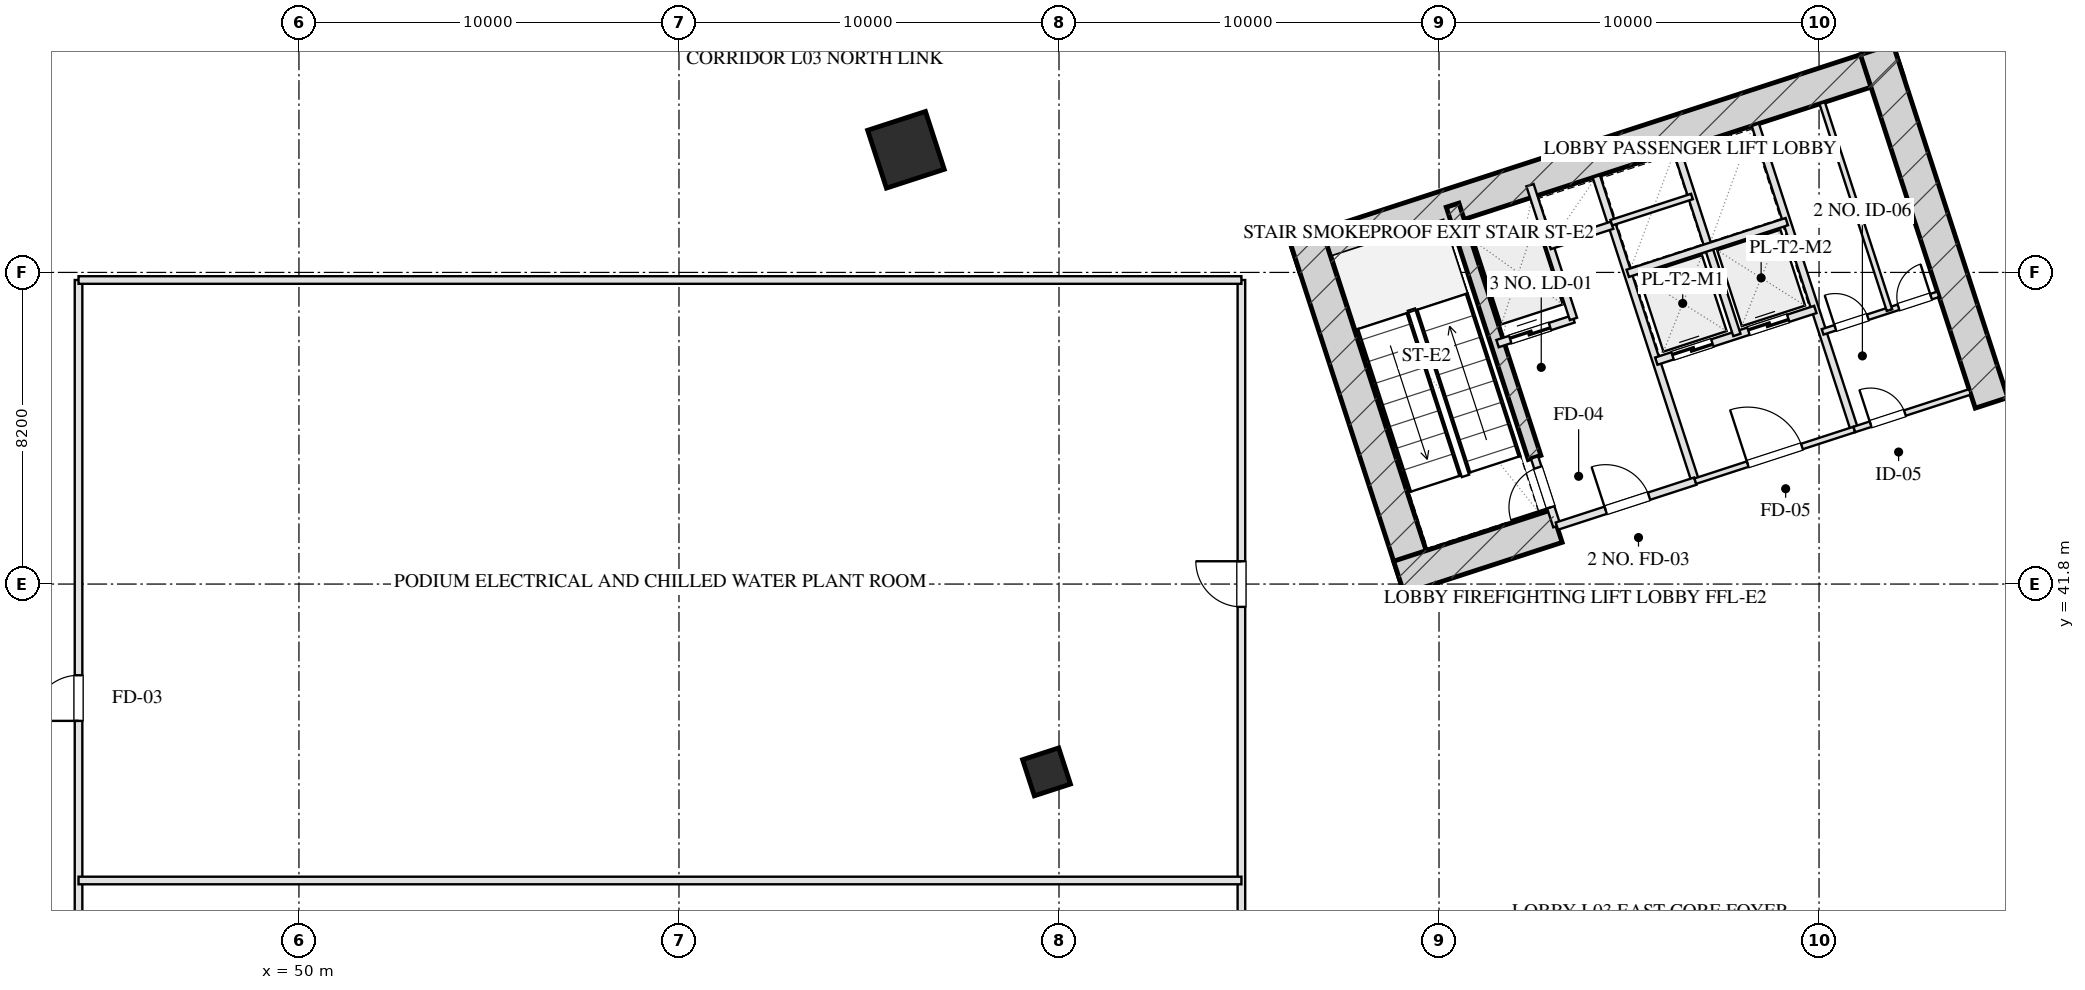
"""IFC4 building model, lengths in metres.
Left out: names, types, materials, properties, quantities, classifications, styles, units other than length and angle.
Written with IfcOpenShell. Run it as: python <this file> out.ifc"""

import sys

from ifc_helpers import new_model, si_unit, direction, frame, frame_2d, origin, origin_2d, place, context, subcontext, project, spatial, rectangle, hollow_rectangle, extrude, element, fill, save


model = new_model("IFC4")
c1 = context("Model", 3, precision=1e-05, world=origin(), true_north=direction((0.0, 1.0)))
c2 = subcontext(c1, "Body", "Model", "MODEL_VIEW")
j1 = project(units=[si_unit("LENGTHUNIT", "METRE"), si_unit("PLANEANGLEUNIT", "RADIAN")], contexts=[c1])
p1 = place(None, origin())
s1 = spatial("IfcSite", under=j1, at=p1, CompositionType="ELEMENT")
p2 = place(p1, origin())
s2 = spatial("IfcBuilding", under=s1, at=p2, CompositionType="ELEMENT")
p3 = place(p2, frame((0.0, 0.0, 16.5)))
s3 = spatial("IfcBuildingStorey", under=s2, at=p3, CompositionType="ELEMENT", Elevation=16.5)
p4 = place(p3, frame((76.201, 50.419, 0.0), z_axis=(0.0, 0.0, 1.0), x_axis=(0.951056412142, 0.309017314926, 0.0)))
e1 = element("IfcWall", 1, at=p4, inside=s3, PredefinedType="SHEAR", context=c2, shape_type="SweptSolid", body=[
    extrude(rectangle(XDim=16.7, YDim=0.9, at=frame_2d((8.35, 0.0))), origin(), (0.0, 0.0, 1.0), 5.5),
])
for number, where, z_axis, x_axis in (
    (2, (79.512, 41.685, 0.0), (0.0, 0.0, 1.0), (-0.309, 0.951, 0.0)),
    (3, (94.539, 46.568, 0.0), (0.0, 0.0, 1.0), (-0.309, 0.951, 0.0)),
):
    element("IfcWall", number, at=place(p3, frame(where, z_axis=z_axis, x_axis=x_axis)), inside=s3, PredefinedType="SHEAR", context=c2, shape_type="SweptSolid", body=[
        extrude(rectangle(XDim=9.78, YDim=0.9, at=frame_2d((4.89, 0.0))), origin(), (0.0, 0.0, 1.0), 5.5),
    ])
p5 = place(p3, frame((82.514, 45.131, 0.0), z_axis=(0.0, 0.0, 1.0), x_axis=(-0.308988790936, 0.951065679686, 0.0)))
e4 = element("IfcWall", 4, at=p5, inside=s3, PredefinedType="SHEAR", context=c2, shape_type="SweptSolid", body=[
    extrude(rectangle(XDim=6.98, YDim=0.35, at=frame_2d((3.49, 0.0))), origin(), (0.0, 0.0, 1.0), 5.5),
])
p6 = place(p3, frame((78.945, 41.974, 0.0), z_axis=(0.0, 0.0, 1.0), x_axis=(0.951058289404, 0.309011537255, 0.0)))
e5 = element("IfcWall", 5, at=p6, inside=s3, PredefinedType="SHEAR", context=c2, shape_type="SweptSolid", body=[
    extrude(rectangle(XDim=4.37, YDim=0.9, at=frame_2d((2.185, 0.0))), origin(), (0.0, 0.0, 1.0), 5.5),
])
p7 = place(p3, frame((65.973, 53.226, 0.0), z_axis=(0.0, 0.0, 1.0), x_axis=(0.951056516295, 0.309016994375, 0.0)))
e6 = element("IfcColumn", 6, at=p7, inside=s3, PredefinedType="COLUMN", context=c2, shape_type="SweptSolid", body=[
    extrude(hollow_rectangle(XDim=1.6, YDim=1.6, WallThickness=0.055, at=origin_2d()), origin(), (0.0, 0.0, 1.0), 5.501),
])
p8 = place(p3, frame((69.672, 36.858, 0.0), z_axis=(0.0, 0.0, 1.0), x_axis=(0.951056516295, 0.309016994375, 0.0)))
e7 = element("IfcColumn", 7, at=p8, inside=s3, PredefinedType="COLUMN", context=c2, shape_type="SweptSolid", body=[
    extrude(hollow_rectangle(XDim=1.0, YDim=1.0, WallThickness=0.036, at=origin_2d()), origin(), (0.0, 0.0, 1.0), 5.501),
])
p9 = place(p3, frame((83.101, 43.324, 0.0), z_axis=(0.0, 0.0, 1.0), x_axis=(-0.309048298632, 0.951046344356, 0.0)))
e8 = element("IfcWall", 8, at=p9, inside=s3, PredefinedType="PARTITIONING", context=c2, shape_type="SweptSolid", body=[
    extrude(rectangle(XDim=1.9, YDim=0.2, at=frame_2d((0.95, 0.0))), origin(), (0.0, 0.0, 1.0), 5.185),
])
p10 = place(p9, frame((0.52, 0.0, 0.0)))
e9 = element("IfcOpeningElement", 9, at=p10, cuts=e8, PredefinedType="OPENING", context=c2, shape_type="SweptSolid", body=[
    extrude(rectangle(XDim=1.1, YDim=2.05, at=frame_2d((0.55, 1.025))), frame((0.0, 0.11, 0.0), z_axis=(0.0, -1.0, 0.0), x_axis=(1.0, 0.0, 0.0)), (0.0, 0.0, 1.0), 0.22),
])
p11 = place(p3, frame((86.743, 44.508, 0.0), z_axis=(0.0, 0.0, 1.0), x_axis=(-0.309016001439, 0.951056838919, 0.0)))
e10 = element("IfcWall", 10, at=p11, inside=s3, PredefinedType="PARTITIONING", context=c2, shape_type="SweptSolid", body=[
    extrude(rectangle(XDim=8.43, YDim=0.2, at=frame_2d((4.215, 0.0))), origin(), (0.0, 0.0, 1.0), 5.185),
])
p12 = place(p3, frame((83.101, 43.324, 0.0), z_axis=(0.0, 0.0, 1.0), x_axis=(0.951052804469, 0.309028417967, 0.0)))
e11 = element("IfcWall", 11, at=p12, inside=s3, PredefinedType="PARTITIONING", context=c2, shape_type="SweptSolid", body=[
    extrude(rectangle(XDim=3.83, YDim=0.2, at=frame_2d((1.915, 0.0))), origin(), (0.0, 0.0, 1.0), 5.185),
])
p13 = place(p12, frame((1.35, 0.0, 0.0)))
e12 = element("IfcOpeningElement", 12, at=p13, cuts=e11, PredefinedType="OPENING", context=c2, shape_type="SweptSolid", body=[
    extrude(rectangle(XDim=1.2, YDim=2.05, at=frame_2d((0.6, 1.025))), frame((0.0, 0.11, 0.0), z_axis=(0.0, -1.0, 0.0), x_axis=(1.0, 0.0, 0.0)), (0.0, 0.0, 1.0), 0.22),
])
p14 = place(p3, frame((81.54, 48.127, 0.0), z_axis=(0.0, 0.0, 1.0), x_axis=(0.951062257173, 0.308999325213, 0.0)))
e13 = element("IfcWall", 13, at=p14, inside=s3, PredefinedType="PARTITIONING", context=c2, shape_type="SweptSolid", body=[
    extrude(rectangle(XDim=2.1, YDim=0.2, at=frame_2d((1.05, 0.0))), origin(), (0.0, 0.0, 1.0), 5.185),
])
p15 = place(p14, frame((0.35, 0.0, 0.0)))
e14 = element("IfcOpeningElement", 14, at=p15, cuts=e13, PredefinedType="OPENING", context=c2, shape_type="SweptSolid", body=[
    extrude(rectangle(XDim=1.1, YDim=2.05, at=frame_2d((0.55, 1.025))), frame((0.0, 0.11, 0.0), z_axis=(0.0, -1.0, 0.0), x_axis=(1.0, 0.0, 0.0)), (0.0, 0.0, 1.0), 0.22),
])
p16 = place(p3, frame((83.538, 48.776, 0.0), z_axis=(0.0, 0.0, 1.0), x_axis=(-0.3089935693, 0.951064127245, 0.0)))
e15 = element("IfcWall", 15, at=p16, inside=s3, PredefinedType="PARTITIONING", context=c2, shape_type="SweptSolid", body=[
    extrude(rectangle(XDim=3.7, YDim=0.2, at=frame_2d((1.85, 0.0))), origin(), (0.0, 0.0, 1.0), 5.185),
])
p17 = place(p3, frame((82.91, 50.707, 0.0), z_axis=(0.0, 0.0, 1.0), x_axis=(0.951041328149, 0.309063734775, 0.0)))
e16 = element("IfcWall", 16, at=p17, inside=s3, PredefinedType="PARTITIONING", context=c2, shape_type="SweptSolid", body=[
    extrude(rectangle(XDim=1.73, YDim=0.2, at=frame_2d((0.865, 0.0))), origin(), (0.0, 0.0, 1.0), 5.185),
])
p18 = place(p3, frame((90.928, 45.868, 0.0), z_axis=(0.0, 0.0, 1.0), x_axis=(-0.309042196757, 0.951048327176, 0.0)))
e17 = element("IfcWall", 17, at=p18, inside=s3, PredefinedType="PARTITIONING", context=c2, shape_type="SweptSolid", body=[
    extrude(rectangle(XDim=8.43, YDim=0.2, at=frame_2d((4.215, 0.0))), origin(), (0.0, 0.0, 1.0), 5.185),
])
p19 = place(p3, frame((86.743, 44.508, 0.0), z_axis=(0.0, 0.0, 1.0), x_axis=(0.951063829732, 0.308994485023, 0.0)))
e18 = element("IfcWall", 18, at=p19, inside=s3, PredefinedType="PARTITIONING", context=c2, shape_type="SweptSolid", body=[
    extrude(rectangle(XDim=4.4, YDim=0.15, at=frame_2d((2.2, 0.0))), origin(), (0.0, 0.0, 1.0), 5.185),
])
p20 = place(p19, frame((1.45, 0.0, 0.0)))
e19 = element("IfcOpeningElement", 19, at=p20, cuts=e18, PredefinedType="OPENING", context=c2, shape_type="SweptSolid", body=[
    extrude(rectangle(XDim=1.5, YDim=2.05, at=frame_2d((0.75, 1.025))), frame((0.0, 0.085, 0.0), z_axis=(0.0, -1.0, 0.0), x_axis=(1.0, 0.0, 0.0)), (0.0, 0.0, 1.0), 0.17),
])
p21 = place(p3, frame((85.718, 47.666, 0.0), z_axis=(0.0, 0.0, 1.0), x_axis=(0.951058531764, 0.30901079133, 0.0)))
e20 = element("IfcWall", 20, at=p21, inside=s3, PredefinedType="PARTITIONING", context=c2, shape_type="SweptSolid", body=[
    extrude(rectangle(XDim=4.4, YDim=0.2, at=frame_2d((2.2, 0.0))), origin(), (0.0, 0.0, 1.0), 5.185),
])
p22 = place(p21, frame((0.45, 0.0, 0.0)))
e21 = element("IfcOpeningElement", 21, at=p22, cuts=e20, PredefinedType="OPENING", context=c2, shape_type="SweptSolid", body=[
    extrude(rectangle(XDim=1.1, YDim=2.05, at=frame_2d((0.55, 1.025))), frame((0.0, 0.11, 0.0), z_axis=(0.0, -1.0, 0.0), x_axis=(1.0, 0.0, 0.0)), (0.0, 0.0, 1.0), 0.22),
])
p23 = place(p21, frame((2.55, 0.0, 0.0)))
e22 = element("IfcOpeningElement", 22, at=p23, cuts=e20, PredefinedType="OPENING", context=c2, shape_type="SweptSolid", body=[
    extrude(rectangle(XDim=1.1, YDim=2.05, at=frame_2d((0.55, 1.025))), frame((0.0, 0.11, 0.0), z_axis=(0.0, -1.0, 0.0), x_axis=(1.0, 0.0, 0.0)), (0.0, 0.0, 1.0), 0.22),
])
p24 = place(p3, frame((87.838, 48.354, 0.0), z_axis=(0.0, 0.0, 1.0), x_axis=(-0.3090093719, 0.951058992953, 0.0)))
e23 = element("IfcWall", 23, at=p24, inside=s3, PredefinedType="PARTITIONING", context=c2, shape_type="SweptSolid", body=[
    extrude(rectangle(XDim=5.11, YDim=0.2, at=frame_2d((2.555, 0.0))), origin(), (0.0, 0.0, 1.0), 5.185),
])
p25 = place(p3, frame((84.967, 49.977, 0.0), z_axis=(0.0, 0.0, 1.0), x_axis=(0.951063829732, 0.308994485023, 0.0)))
e24 = element("IfcWall", 24, at=p25, inside=s3, PredefinedType="PARTITIONING", context=c2, shape_type="SweptSolid", body=[
    extrude(rectangle(XDim=4.4, YDim=0.2, at=frame_2d((2.2, 0.0))), origin(), (0.0, 0.0, 1.0), 5.185),
])
p26 = place(p3, frame((84.534, 51.308, 0.0), z_axis=(0.0, 0.0, 1.0), x_axis=(0.951075093106, 0.308959814982, 0.0)))
e25 = element("IfcWall", 25, at=p26, inside=s3, PredefinedType="PARTITIONING", context=c2, shape_type="SweptSolid", body=[
    extrude(rectangle(XDim=2.23, YDim=0.15, at=frame_2d((1.115, 0.0))), origin(), (0.0, 0.0, 1.0), 5.185),
])
p27 = place(p3, frame((90.928, 45.868, 0.0), z_axis=(0.0, 0.0, 1.0), x_axis=(0.951059297078, 0.309008435874, 0.0)))
e26 = element("IfcWall", 26, at=p27, inside=s3, PredefinedType="PARTITIONING", context=c2, shape_type="SweptSolid", body=[
    extrude(rectangle(XDim=3.2, YDim=0.15, at=frame_2d((1.6, 0.0))), origin(), (0.0, 0.0, 1.0), 5.185),
])
p28 = place(p27, frame((0.45, 0.0, 0.0)))
e27 = element("IfcOpeningElement", 27, at=p28, cuts=e26, PredefinedType="OPENING", context=c2, shape_type="SweptSolid", body=[
    extrude(rectangle(XDim=0.95, YDim=2.05, at=frame_2d((0.475, 1.025))), frame((0.0, 0.085, 0.0), z_axis=(0.0, -1.0, 0.0), x_axis=(1.0, 0.0, 0.0)), (0.0, 0.0, 1.0), 0.17),
])
p29 = place(p3, frame((90.094, 48.436, 0.0), z_axis=(0.0, 0.0, 1.0), x_axis=(0.951066581729, 0.308986014439, 0.0)))
e28 = element("IfcWall", 28, at=p29, inside=s3, PredefinedType="PARTITIONING", context=c2, shape_type="SweptSolid", body=[
    extrude(rectangle(XDim=3.2, YDim=0.15, at=frame_2d((1.6, 0.0))), origin(), (0.0, 0.0, 1.0), 5.185),
])
p30 = place(p29, frame((0.35, 0.0, 0.0)))
e29 = element("IfcOpeningElement", 29, at=p30, cuts=e28, PredefinedType="OPENING", context=c2, shape_type="SweptSolid", body=[
    extrude(rectangle(XDim=0.9, YDim=2.05, at=frame_2d((0.45, 1.025))), frame((0.0, 0.085, 0.0), z_axis=(0.0, -1.0, 0.0), x_axis=(1.0, 0.0, 0.0)), (0.0, 0.0, 1.0), 0.17),
])
p31 = place(p29, frame((2.1, 0.0, 0.0)))
e30 = element("IfcOpeningElement", 30, at=p31, cuts=e28, PredefinedType="OPENING", context=c2, shape_type="SweptSolid", body=[
    extrude(rectangle(XDim=0.9, YDim=2.05, at=frame_2d((0.45, 1.025))), frame((0.0, 0.085, 0.0), z_axis=(0.0, -1.0, 0.0), x_axis=(1.0, 0.0, 0.0)), (0.0, 0.0, 1.0), 0.17),
])
p32 = place(p3, frame((91.853, 49.007, 0.0), z_axis=(0.0, 0.0, 1.0), x_axis=(-0.309022487551, 0.951054731437, 0.0)))
e31 = element("IfcWall", 31, at=p32, inside=s3, PredefinedType="PARTITIONING", context=c2, shape_type="SweptSolid", body=[
    extrude(rectangle(XDim=5.73, YDim=0.15, at=frame_2d((2.865, 0.0))), origin(), (0.0, 0.0, 1.0), 5.185),
])
p33 = place(p3, frame((44.2, 18.2, 0.0), z_axis=(0.0, 0.0, 1.0), x_axis=(0.0, 1.0, 0.0)))
e32 = element("IfcWall", 32, at=p33, inside=s3, PredefinedType="PARTITIONING", context=c2, shape_type="SweptSolid", body=[
    extrude(rectangle(XDim=31.6, YDim=0.2, at=frame_2d((15.8, 0.0))), origin(), (0.0, 0.0, 1.0), 5.185),
])
p34 = place(p33, frame((5.1, 0.0, 0.0)))
e33 = element("IfcOpeningElement", 33, at=p34, cuts=e32, PredefinedType="OPENING", context=c2, shape_type="SweptSolid", body=[
    extrude(rectangle(XDim=1.2, YDim=2.05, at=frame_2d((0.6, 1.025))), frame((0.0, 0.11, 0.0), z_axis=(0.0, -1.0, 0.0), x_axis=(1.0, 0.0, 0.0)), (0.0, 0.0, 1.0), 0.22),
])
p35 = place(p33, frame((20.0, 0.0, 0.0)))
e34 = element("IfcOpeningElement", 34, at=p35, cuts=e32, PredefinedType="OPENING", context=c2, shape_type="SweptSolid", body=[
    extrude(rectangle(XDim=1.2, YDim=2.05, at=frame_2d((0.6, 1.025))), frame((0.0, 0.11, 0.0), z_axis=(0.0, -1.0, 0.0), x_axis=(1.0, 0.0, 0.0)), (0.0, 0.0, 1.0), 0.22),
])
p36 = place(p3, frame((74.8, 18.2, 0.0), z_axis=(0.0, 0.0, 1.0), x_axis=(0.0, 1.0, 0.0)))
e35 = element("IfcWall", 35, at=p36, inside=s3, PredefinedType="PARTITIONING", context=c2, shape_type="SweptSolid", body=[
    extrude(rectangle(XDim=31.6, YDim=0.2, at=frame_2d((15.8, 0.0))), origin(), (0.0, 0.0, 1.0), 5.185),
])
p37 = place(p36, frame((23.0, 0.0, 0.0)))
e36 = element("IfcOpeningElement", 36, at=p37, cuts=e35, PredefinedType="OPENING", context=c2, shape_type="SweptSolid", body=[
    extrude(rectangle(XDim=1.2, YDim=2.05, at=frame_2d((0.6, 1.025))), frame((0.0, 0.11, 0.0), z_axis=(0.0, -1.0, 0.0), x_axis=(1.0, 0.0, 0.0)), (0.0, 0.0, 1.0), 0.22),
])
p38 = place(p3, frame((44.2, 49.8, 0.0), z_axis=(0.0, 0.0, 1.0), x_axis=(1.0, 0.0, 0.0)))
e37 = element("IfcWall", 37, at=p38, inside=s3, PredefinedType="PARTITIONING", context=c2, shape_type="SweptSolid", body=[
    extrude(rectangle(XDim=30.6, YDim=0.2, at=frame_2d((15.3, 0.0))), origin(), (0.0, 0.0, 1.0), 5.185),
])
p39 = place(p3, frame((44.2, 34.0, 0.0), z_axis=(0.0, 0.0, 1.0), x_axis=(1.0, 0.0, 0.0)))
e38 = element("IfcWall", 38, at=p39, inside=s3, PredefinedType="PARTITIONING", context=c2, shape_type="SweptSolid", body=[
    extrude(rectangle(XDim=30.6, YDim=0.2, at=frame_2d((15.3, 0.0))), origin(), (0.0, 0.0, 1.0), 3.775),
])
p40 = place(p10, origin())
e39 = element("IfcDoor", 39, at=p40, inside=s3, OperationType="SINGLE_SWING_LEFT", PredefinedType="DOOR", context=c2, shape_type="SweptSolid", body=[
    extrude(rectangle(XDim=1.1, YDim=2.05, at=frame_2d((0.55, 1.025))), frame((0.0, 0.025, 0.0), z_axis=(0.0, -1.0, 0.0), x_axis=(1.0, 0.0, 0.0)), (0.0, 0.0, 1.0), 0.05),
])
fill(e9, e39)
p41 = place(p13, origin())
e40 = element("IfcDoor", 40, at=p41, inside=s3, OperationType="SINGLE_SWING_LEFT", PredefinedType="DOOR", context=c2, shape_type="SweptSolid", body=[
    extrude(rectangle(XDim=1.2, YDim=2.05, at=frame_2d((0.6, 1.025))), frame((0.0, 0.025, 0.0), z_axis=(0.0, -1.0, 0.0), x_axis=(1.0, 0.0, 0.0)), (0.0, 0.0, 1.0), 0.05),
])
fill(e12, e40)
p42 = place(p15, origin())
e41 = element("IfcDoor", 41, at=p42, inside=s3, OperationType="DOUBLE_DOOR_SLIDING", PredefinedType="DOOR", context=c2, shape_type="SweptSolid", body=[
    extrude(rectangle(XDim=1.1, YDim=2.05, at=frame_2d((0.55, 1.025))), frame((0.0, 0.025, 0.0), z_axis=(0.0, -1.0, 0.0), x_axis=(1.0, 0.0, 0.0)), (0.0, 0.0, 1.0), 0.05),
])
fill(e14, e41)
p43 = place(p20, origin())
e42 = element("IfcDoor", 42, at=p43, inside=s3, OperationType="SINGLE_SWING_LEFT", PredefinedType="DOOR", context=c2, shape_type="SweptSolid", body=[
    extrude(rectangle(XDim=1.5, YDim=2.05, at=frame_2d((0.75, 1.025))), frame((0.0, 0.025, 0.0), z_axis=(0.0, -1.0, 0.0), x_axis=(1.0, 0.0, 0.0)), (0.0, 0.0, 1.0), 0.05),
])
fill(e19, e42)
p44 = place(p22, origin())
e43 = element("IfcDoor", 43, at=p44, inside=s3, OperationType="DOUBLE_DOOR_SLIDING", PredefinedType="DOOR", context=c2, shape_type="SweptSolid", body=[
    extrude(rectangle(XDim=1.1, YDim=2.05, at=frame_2d((0.55, 1.025))), frame((0.0, 0.025, 0.0), z_axis=(0.0, -1.0, 0.0), x_axis=(1.0, 0.0, 0.0)), (0.0, 0.0, 1.0), 0.05),
])
fill(e21, e43)
p45 = place(p23, origin())
e44 = element("IfcDoor", 44, at=p45, inside=s3, OperationType="DOUBLE_DOOR_SLIDING", PredefinedType="DOOR", context=c2, shape_type="SweptSolid", body=[
    extrude(rectangle(XDim=1.1, YDim=2.05, at=frame_2d((0.55, 1.025))), frame((0.0, 0.025, 0.0), z_axis=(0.0, -1.0, 0.0), x_axis=(1.0, 0.0, 0.0)), (0.0, 0.0, 1.0), 0.05),
])
fill(e22, e44)
p46 = place(p28, origin())
e45 = element("IfcDoor", 45, at=p46, inside=s3, OperationType="SINGLE_SWING_LEFT", PredefinedType="DOOR", context=c2, shape_type="SweptSolid", body=[
    extrude(rectangle(XDim=0.95, YDim=2.05, at=frame_2d((0.475, 1.025))), frame((0.0, 0.025, 0.0), z_axis=(0.0, -1.0, 0.0), x_axis=(1.0, 0.0, 0.0)), (0.0, 0.0, 1.0), 0.05),
])
fill(e27, e45)
p47 = place(p30, origin())
e46 = element("IfcDoor", 46, at=p47, inside=s3, OperationType="SINGLE_SWING_LEFT", PredefinedType="DOOR", context=c2, shape_type="SweptSolid", body=[
    extrude(rectangle(XDim=0.9, YDim=2.05, at=frame_2d((0.45, 1.025))), frame((0.0, 0.025, 0.0), z_axis=(0.0, -1.0, 0.0), x_axis=(1.0, 0.0, 0.0)), (0.0, 0.0, 1.0), 0.05),
])
fill(e29, e46)
p48 = place(p31, origin())
e47 = element("IfcDoor", 47, at=p48, inside=s3, OperationType="SINGLE_SWING_RIGHT", PredefinedType="DOOR", context=c2, shape_type="SweptSolid", body=[
    extrude(rectangle(XDim=0.9, YDim=2.05, at=frame_2d((0.45, 1.025))), frame((0.0, 0.025, 0.0), z_axis=(0.0, -1.0, 0.0), x_axis=(1.0, 0.0, 0.0)), (0.0, 0.0, 1.0), 0.05),
])
fill(e30, e47)
p49 = place(p35, origin())
e48 = element("IfcDoor", 48, at=p49, inside=s3, OperationType="SINGLE_SWING_LEFT", PredefinedType="DOOR", context=c2, shape_type="SweptSolid", body=[
    extrude(rectangle(XDim=1.2, YDim=2.05, at=frame_2d((0.6, 1.025))), frame((0.0, 0.025, 0.0), z_axis=(0.0, -1.0, 0.0), x_axis=(1.0, 0.0, 0.0)), (0.0, 0.0, 1.0), 0.05),
])
fill(e34, e48)
p50 = place(p37, origin())
e49 = element("IfcDoor", 49, at=p50, inside=s3, OperationType="SINGLE_SWING_RIGHT", PredefinedType="DOOR", context=c2, shape_type="SweptSolid", body=[
    extrude(rectangle(XDim=1.2, YDim=2.05, at=frame_2d((0.6, 1.025))), frame((0.0, 0.025, 0.0), z_axis=(0.0, -1.0, 0.0), x_axis=(1.0, 0.0, 0.0)), (0.0, 0.0, 1.0), 0.05),
])
fill(e36, e49)
save(model, sys.argv[1])
